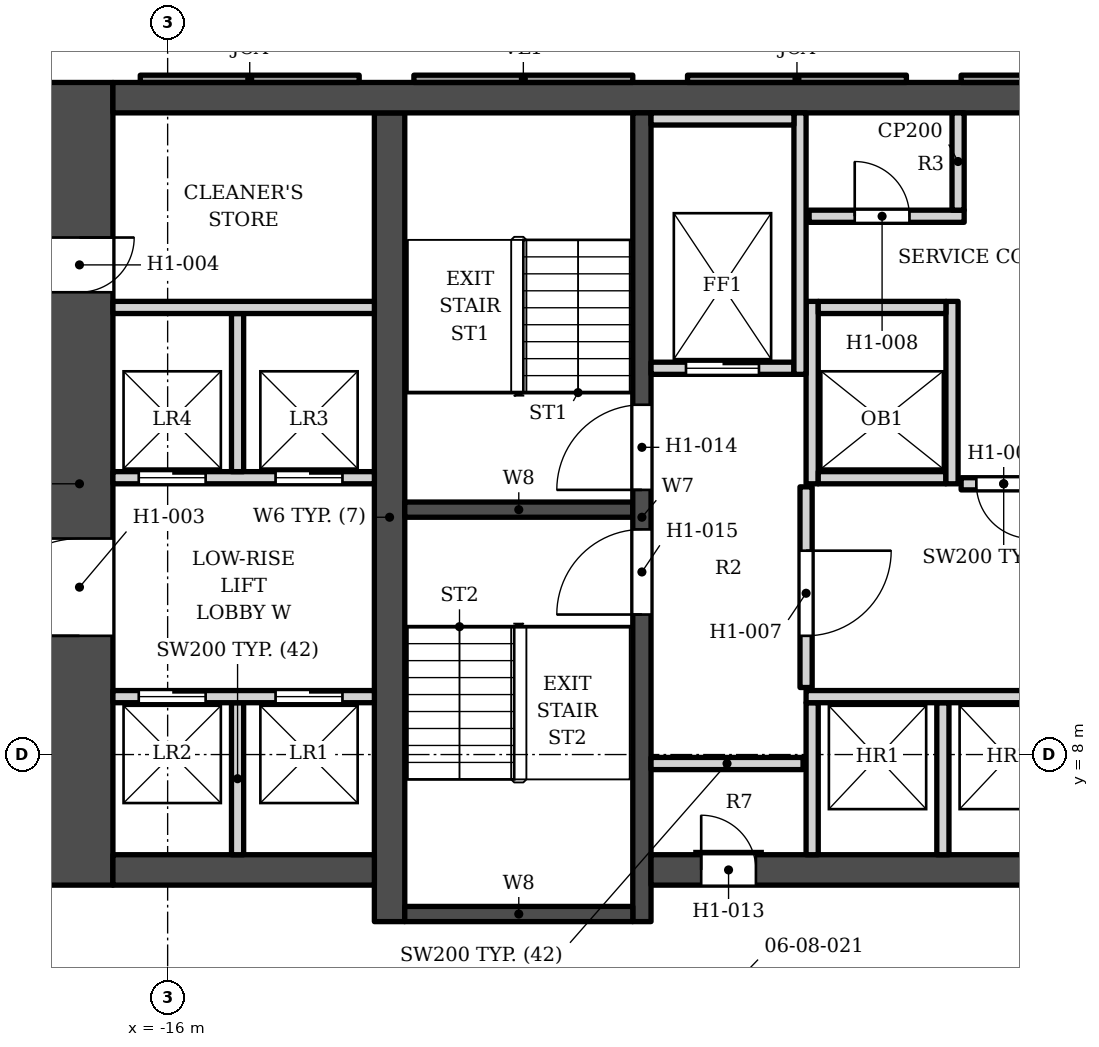
"""IFC4 building model, lengths in metres.
Left out: names, types, materials, properties, quantities, classifications, styles, units other than length and angle.
Written with IfcOpenShell. Run it as: python <this file> out.ifc"""

import sys

from ifc_helpers import new_model, si_unit, direction, frame, frame_2d, origin, place, context, subcontext, project, spatial, polyline, rectangle, outline, extrude, element, fill, save


model = new_model("IFC4")
c1 = context("Model", 3, precision=1e-05, world=origin(), true_north=direction((0.0, 1.0)))
c2 = subcontext(c1, "Body", "Model", "MODEL_VIEW")
j1 = project(units=[si_unit("LENGTHUNIT", "METRE"), si_unit("PLANEANGLEUNIT", "RADIAN")], contexts=[c1])
p1 = place(None, origin())
s1 = spatial("IfcSite", under=j1, at=p1, CompositionType="ELEMENT")
p2 = place(p1, origin())
s2 = spatial("IfcBuilding", under=s1, at=p2, CompositionType="ELEMENT")
p3 = place(p2, frame((0.0, 0.0, 46.0)))
s3 = spatial("IfcBuildingStorey", under=s2, at=p3, CompositionType="ELEMENT", Elevation=46.0)
p4 = place(p3, frame((-16.9, 18.802, 0.0), z_axis=(0.0, 0.0, 1.0), x_axis=(1.0, 0.0, 0.0)))
e1 = element("IfcWall", 1, at=p4, inside=s3, PredefinedType="SHEAR", context=c2, shape_type="SweptSolid", body=[
    extrude(rectangle(XDim=33.8, YDim=0.5, at=frame_2d((16.9, 0.0))), origin(), (0.0, 0.0, 1.0), 3.4),
])
p5 = place(p3, frame((-12.35, 5.253, 0.0), z_axis=(0.0, 0.0, 1.0), x_axis=(0.0, 1.0, 0.0)))
e2 = element("IfcWall", 2, at=p5, inside=s3, PredefinedType="SHEAR", context=c2, shape_type="SweptSolid", body=[
    extrude(rectangle(XDim=13.3, YDim=0.5, at=frame_2d((6.65, 0.0))), origin(), (0.0, 0.0, 1.0), 3.4),
])
p6 = place(p3, frame((-8.2, 5.253, 0.0), z_axis=(0.0, 0.0, 1.0), x_axis=(0.0, 1.0, 0.0)))
e3 = element("IfcWall", 3, at=p6, inside=s3, PredefinedType="SHEAR", context=c2, shape_type="SweptSolid", body=[
    extrude(rectangle(XDim=13.3, YDim=0.3, at=frame_2d((6.65, 0.0))), origin(), (0.0, 0.0, 1.0), 3.4),
])
p7 = place(p6, frame((7.1, 0.0, 0.0)))
e4 = element("IfcOpeningElement", 4, at=p7, cuts=e3, PredefinedType="OPENING", context=c2, shape_type="SweptSolid", body=[
    extrude(rectangle(XDim=1.4, YDim=2.1, at=frame_2d((0.7, 1.05))), frame((0.0, 0.16, 0.0), z_axis=(0.0, -1.0, 0.0), x_axis=(1.0, 0.0, 0.0)), (0.0, 0.0, 1.0), 0.32),
])
p8 = place(p6, frame((5.05, 0.0, 0.0)))
e5 = element("IfcOpeningElement", 5, at=p8, cuts=e3, PredefinedType="OPENING", context=c2, shape_type="SweptSolid", body=[
    extrude(rectangle(XDim=1.4, YDim=2.1, at=frame_2d((0.7, 1.05))), frame((0.0, 0.16, 0.0), z_axis=(0.0, -1.0, 0.0), x_axis=(1.0, 0.0, 0.0)), (0.0, 0.0, 1.0), 0.32),
])
for number, where, z_axis, x_axis in (
    (6, (-12.1, 12.028, 0.0), (0.0, 0.0, 1.0), (1.0, 0.0, 0.0)),
    (7, (-12.1, 5.378, 0.0), (0.0, 0.0, 1.0), (1.0, 0.0, 0.0)),
):
    element("IfcWall", number, at=place(p3, frame(where, z_axis=z_axis, x_axis=x_axis)), inside=s3, PredefinedType="SHEAR", context=c2, shape_type="SweptSolid", body=[
        extrude(rectangle(XDim=3.75, YDim=0.25, at=frame_2d((1.875, 0.0))), origin(), (0.0, 0.0, 1.0), 3.4),
    ])
p9 = place(p3, frame((-8.05, 6.103, 0.0), z_axis=(0.0, 0.0, 1.0), x_axis=(1.0, 0.0, 0.0)))
e8 = element("IfcWall", 8, at=p9, inside=s3, PredefinedType="SHEAR", context=c2, shape_type="SweptSolid", body=[
    extrude(rectangle(XDim=7.05, YDim=0.5, at=frame_2d((3.525, 0.0))), origin(), (0.0, 0.0, 1.0), 3.4),
])
p10 = place(p9, frame((0.825, 0.0, 0.0)))
e9 = element("IfcOpeningElement", 9, at=p10, cuts=e8, PredefinedType="OPENING", context=c2, shape_type="SweptSolid", body=[
    extrude(rectangle(XDim=0.9, YDim=2.1, at=frame_2d((0.45, 1.05))), frame((0.0, 0.26, 0.0), z_axis=(0.0, -1.0, 0.0), x_axis=(1.0, 0.0, 0.0)), (0.0, 0.0, 1.0), 0.52),
])
p11 = place(p3, frame((-12.6, 6.103, 0.0), z_axis=(0.0, 0.0, 1.0), x_axis=(-1.0, 0.0, 0.0)))
e10 = element("IfcWall", 10, at=p11, inside=s3, PredefinedType="SHEAR", context=c2, shape_type="SweptSolid", body=[
    extrude(rectangle(XDim=4.3, YDim=0.5, at=frame_2d((2.15, 0.0))), origin(), (0.0, 0.0, 1.0), 3.4),
])
p12 = place(p3, frame((-17.45, 5.853, 0.0), z_axis=(0.0, 0.0, 1.0), x_axis=(0.0, 1.0, 0.0)))
e11 = element("IfcWall", 11, at=p12, inside=s3, PredefinedType="SHEAR", context=c2, shape_type="SweptSolid", body=[
    extrude(rectangle(XDim=13.2, YDim=1.1, at=frame_2d((6.6, 0.0))), origin(), (0.0, 0.0, 1.0), 3.4),
])
p13 = place(p12, frame((4.1, 0.0, 0.0)))
e12 = element("IfcOpeningElement", 12, at=p13, cuts=e11, PredefinedType="OPENING", context=c2, shape_type="SweptSolid", body=[
    extrude(rectangle(XDim=1.6, YDim=2.1, at=frame_2d((0.8, 1.05))), frame((0.0, 0.56, 0.0), z_axis=(0.0, -1.0, 0.0), x_axis=(1.0, 0.0, 0.0)), (0.0, 0.0, 1.0), 1.12),
])
p14 = place(p12, frame((9.75, 0.0, 0.0)))
e13 = element("IfcOpeningElement", 13, at=p14, cuts=e11, PredefinedType="OPENING", context=c2, shape_type="SweptSolid", body=[
    extrude(rectangle(XDim=0.9, YDim=2.1, at=frame_2d((0.45, 1.05))), frame((0.0, 0.56, 0.0), z_axis=(0.0, -1.0, 0.0), x_axis=(1.0, 0.0, 0.0)), (0.0, 0.0, 1.0), 1.12),
])
p15 = place(p3, origin())
e14 = element("IfcWall", 14, at=p15, inside=s3, PredefinedType="ELEMENTEDWALL", context=c2, shape_type="SweptSolid", body=[
    extrude(outline(polyline([(-2.95, 19.173), (-2.95, 19.052), (0.65, 19.052), (0.65, 19.173), (-2.95, 19.173)])), origin(), (0.0, 0.0, 1.0), 2.65),
])
p16 = place(p3, origin())
e15 = element("IfcWall", 15, at=p16, inside=s3, PredefinedType="SOLIDWALL", context=c2, shape_type="SweptSolid", body=[
    extrude(outline(polyline([(-7.45, 19.173), (-7.45, 19.052), (-3.85, 19.052), (-3.85, 19.173), (-7.45, 19.173)])), origin(), (0.0, 0.0, 1.0), 2.65),
])
p17 = place(p3, origin())
e16 = element("IfcWall", 16, at=p17, inside=s3, PredefinedType="ELEMENTEDWALL", context=c2, shape_type="SweptSolid", body=[
    extrude(outline(polyline([(-11.95, 19.173), (-11.95, 19.052), (-8.35, 19.052), (-8.35, 19.173), (-11.95, 19.173)])), origin(), (0.0, 0.0, 1.0), 2.65),
])
p18 = place(p3, origin())
e17 = element("IfcWall", 17, at=p18, inside=s3, PredefinedType="SOLIDWALL", context=c2, shape_type="SweptSolid", body=[
    extrude(outline(polyline([(-16.45, 19.173), (-16.45, 19.052), (-12.85, 19.052), (-12.85, 19.173), (-16.45, 19.173)])), origin(), (0.0, 0.0, 1.0), 2.65),
])
for number, where, z_axis, x_axis in (
    (18, (-14.85, 6.353, 0.0), (0.0, 0.0, 1.0), (0.0, 1.0, 0.0)),
    (19, (-5.4, 6.353, 0.0), (0.0, 0.0, 1.0), (0.0, 1.0, 0.0)),
    (20, (-3.25, 6.353, 0.0), (0.0, 0.0, 1.0), (0.0, 1.0, 0.0)),
    (21, (-8.05, 7.853, 0.0), (0.0, 0.0, 1.0), (1.0, 0.0, 0.0)),
):
    element("IfcWall", number, at=place(p3, frame(where, z_axis=z_axis, x_axis=x_axis)), inside=s3, PredefinedType="SOLIDWALL", context=c2, shape_type="SweptSolid", body=[
        extrude(rectangle(XDim=2.5, YDim=0.2, at=frame_2d((1.25, 0.0))), origin(), (0.0, 0.0, 1.0), 3.23),
    ])
p19 = place(p3, frame((-16.9, 8.953, 0.0), z_axis=(0.0, 0.0, 1.0), x_axis=(1.0, 0.0, 0.0)))
e22 = element("IfcWall", 22, at=p19, inside=s3, PredefinedType="SOLIDWALL", context=c2, shape_type="SweptSolid", body=[
    extrude(rectangle(XDim=4.3, YDim=0.2, at=frame_2d((2.15, 0.0))), origin(), (0.0, 0.0, 1.0), 3.23),
])
p20 = place(p19, frame((2.675, 0.0, 0.0)))
e23 = element("IfcOpeningElement", 23, at=p20, cuts=e22, PredefinedType="OPENING", context=c2, shape_type="SweptSolid", body=[
    extrude(rectangle(XDim=1.1, YDim=2.1, at=frame_2d((0.55, 1.05))), frame((0.0, 0.11, 0.0), z_axis=(0.0, -1.0, 0.0), x_axis=(1.0, 0.0, 0.0)), (0.0, 0.0, 1.0), 0.22),
])
p21 = place(p19, frame((0.425, 0.0, 0.0)))
e24 = element("IfcOpeningElement", 24, at=p21, cuts=e22, PredefinedType="OPENING", context=c2, shape_type="SweptSolid", body=[
    extrude(rectangle(XDim=1.1, YDim=2.1, at=frame_2d((0.55, 1.05))), frame((0.0, 0.11, 0.0), z_axis=(0.0, -1.0, 0.0), x_axis=(1.0, 0.0, 0.0)), (0.0, 0.0, 1.0), 0.22),
])
p22 = place(p3, frame((-5.5, 8.953, 0.0), z_axis=(0.0, 0.0, 1.0), x_axis=(1.0, 0.0, 0.0)))
e25 = element("IfcWall", 25, at=p22, inside=s3, PredefinedType="SOLIDWALL", context=c2, shape_type="SweptSolid", body=[
    extrude(rectangle(XDim=4.5, YDim=0.2, at=frame_2d((2.25, 0.0))), origin(), (0.0, 0.0, 1.0), 3.23),
])
p23 = place(p3, frame((-5.5, 9.103, 0.0), z_axis=(0.0, 0.0, 1.0), x_axis=(0.0, 1.0, 0.0)))
e26 = element("IfcWall", 26, at=p23, inside=s3, PredefinedType="SOLIDWALL", context=c2, shape_type="SweptSolid", body=[
    extrude(rectangle(XDim=3.3, YDim=0.2, at=frame_2d((1.65, 0.0))), origin(), (0.0, 0.0, 1.0), 3.23),
])
p24 = place(p23, frame((0.85, 0.0, 0.0)))
e27 = element("IfcOpeningElement", 27, at=p24, cuts=e26, PredefinedType="OPENING", context=c2, shape_type="SweptSolid", body=[
    extrude(rectangle(XDim=1.4, YDim=2.1, at=frame_2d((0.7, 1.05))), frame((0.0, 0.11, 0.0), z_axis=(0.0, -1.0, 0.0), x_axis=(1.0, 0.0, 0.0)), (0.0, 0.0, 1.0), 0.22),
])
p25 = place(p3, frame((-2.95, 12.453, 0.0), z_axis=(0.0, 0.0, 1.0), x_axis=(1.0, 0.0, 0.0)))
e28 = element("IfcWall", 28, at=p25, inside=s3, PredefinedType="SOLIDWALL", context=c2, shape_type="SweptSolid", body=[
    extrude(rectangle(XDim=1.4, YDim=0.2, at=frame_2d((0.7, 0.0))), origin(), (0.0, 0.0, 1.0), 3.23),
])
p26 = place(p25, frame((0.25, 0.0, 0.0)))
e29 = element("IfcOpeningElement", 29, at=p26, cuts=e28, PredefinedType="OPENING", context=c2, shape_type="SweptSolid", body=[
    extrude(rectangle(XDim=0.9, YDim=2.1, at=frame_2d((0.45, 1.05))), frame((0.0, 0.11, 0.0), z_axis=(0.0, -1.0, 0.0), x_axis=(1.0, 0.0, 0.0)), (0.0, 0.0, 1.0), 0.22),
])
p27 = place(p3, frame((-16.9, 12.552, 0.0), z_axis=(0.0, 0.0, 1.0), x_axis=(1.0, 0.0, 0.0)))
e30 = element("IfcWall", 30, at=p27, inside=s3, PredefinedType="SOLIDWALL", context=c2, shape_type="SweptSolid", body=[
    extrude(rectangle(XDim=4.3, YDim=0.2, at=frame_2d((2.15, 0.0))), origin(), (0.0, 0.0, 1.0), 3.23),
])
p28 = place(p27, frame((2.675, 0.0, 0.0)))
e31 = element("IfcOpeningElement", 31, at=p28, cuts=e30, PredefinedType="OPENING", context=c2, shape_type="SweptSolid", body=[
    extrude(rectangle(XDim=1.1, YDim=2.1, at=frame_2d((0.55, 1.05))), frame((0.0, 0.11, 0.0), z_axis=(0.0, -1.0, 0.0), x_axis=(1.0, 0.0, 0.0)), (0.0, 0.0, 1.0), 0.22),
])
p29 = place(p27, frame((0.425, 0.0, 0.0)))
e32 = element("IfcOpeningElement", 32, at=p29, cuts=e30, PredefinedType="OPENING", context=c2, shape_type="SweptSolid", body=[
    extrude(rectangle(XDim=1.1, YDim=2.1, at=frame_2d((0.55, 1.05))), frame((0.0, 0.11, 0.0), z_axis=(0.0, -1.0, 0.0), x_axis=(1.0, 0.0, 0.0)), (0.0, 0.0, 1.0), 0.22),
])
p30 = place(p3, frame((-5.4, 12.453, 0.0), z_axis=(0.0, 0.0, 1.0), x_axis=(0.0, 1.0, 0.0)))
e33 = element("IfcWall", 33, at=p30, inside=s3, PredefinedType="SOLIDWALL", context=c2, shape_type="SweptSolid", body=[
    extrude(rectangle(XDim=3.0, YDim=0.2, at=frame_2d((1.5, 0.0))), origin(), (0.0, 0.0, 1.0), 3.23),
])
p31 = place(p3, frame((-5.3, 12.552, 0.0), z_axis=(0.0, 0.0, 1.0), x_axis=(1.0, 0.0, 0.0)))
e34 = element("IfcWall", 34, at=p31, inside=s3, PredefinedType="SOLIDWALL", context=c2, shape_type="SweptSolid", body=[
    extrude(rectangle(XDim=2.1, YDim=0.2, at=frame_2d((1.05, 0.0))), origin(), (0.0, 0.0, 1.0), 3.23),
])
p32 = place(p3, frame((-3.1, 12.453, 0.0), z_axis=(0.0, 0.0, 1.0), x_axis=(0.0, 1.0, 0.0)))
e35 = element("IfcWall", 35, at=p32, inside=s3, PredefinedType="SOLIDWALL", context=c2, shape_type="SweptSolid", body=[
    extrude(rectangle(XDim=3.0, YDim=0.2, at=frame_2d((1.5, 0.0))), origin(), (0.0, 0.0, 1.0), 3.23),
])
p33 = place(p3, frame((-14.85, 12.653, 0.0), z_axis=(0.0, 0.0, 1.0), x_axis=(0.0, 1.0, 0.0)))
e36 = element("IfcWall", 36, at=p33, inside=s3, PredefinedType="SOLIDWALL", context=c2, shape_type="SweptSolid", body=[
    extrude(rectangle(XDim=2.6, YDim=0.2, at=frame_2d((1.3, 0.0))), origin(), (0.0, 0.0, 1.0), 3.23),
])
p34 = place(p3, frame((-8.05, 14.353, 0.0), z_axis=(0.0, 0.0, 1.0), x_axis=(1.0, 0.0, 0.0)))
e37 = element("IfcWall", 37, at=p34, inside=s3, PredefinedType="SOLIDWALL", context=c2, shape_type="SweptSolid", body=[
    extrude(rectangle(XDim=2.35, YDim=0.2, at=frame_2d((1.175, 0.0))), origin(), (0.0, 0.0, 1.0), 3.23),
])
p35 = place(p34, frame((0.575, 0.0, 0.0)))
e38 = element("IfcOpeningElement", 38, at=p35, cuts=e37, PredefinedType="OPENING", context=c2, shape_type="SweptSolid", body=[
    extrude(rectangle(XDim=1.2, YDim=2.1, at=frame_2d((0.6, 1.05))), frame((0.0, 0.11, 0.0), z_axis=(0.0, -1.0, 0.0), x_axis=(1.0, 0.0, 0.0)), (0.0, 0.0, 1.0), 0.22),
])
for number, where, z_axis, x_axis in (
    (39, (-5.6, 14.253, 0.0), (0.0, 0.0, 1.0), (0.0, 1.0, 0.0)),
    (40, (-16.9, 15.353, 0.0), (0.0, 0.0, 1.0), (1.0, 0.0, 0.0)),
):
    element("IfcWall", number, at=place(p3, frame(where, z_axis=z_axis, x_axis=x_axis)), inside=s3, PredefinedType="SOLIDWALL", context=c2, shape_type="SweptSolid", body=[
        extrude(rectangle(XDim=4.3, YDim=0.2, at=frame_2d((2.15, 0.0))), origin(), (0.0, 0.0, 1.0), 3.23),
    ])
p36 = place(p3, frame((-5.3, 15.353, 0.0), z_axis=(0.0, 0.0, 1.0), x_axis=(1.0, 0.0, 0.0)))
e41 = element("IfcWall", 41, at=p36, inside=s3, PredefinedType="SOLIDWALL", context=c2, shape_type="SweptSolid", body=[
    extrude(rectangle(XDim=2.1, YDim=0.2, at=frame_2d((1.05, 0.0))), origin(), (0.0, 0.0, 1.0), 3.23),
])
p37 = place(p3, frame((-5.45, 16.853, 0.0), z_axis=(0.0, 0.0, 1.0), x_axis=(1.0, 0.0, 0.0)))
e42 = element("IfcWall", 42, at=p37, inside=s3, PredefinedType="SOLIDWALL", context=c2, shape_type="SweptSolid", body=[
    extrude(rectangle(XDim=2.55, YDim=0.2, at=frame_2d((1.275, 0.0))), origin(), (0.0, 0.0, 1.0), 3.23),
])
p38 = place(p37, frame((0.75, 0.0, 0.0)))
e43 = element("IfcOpeningElement", 43, at=p38, cuts=e42, PredefinedType="OPENING", context=c2, shape_type="SweptSolid", body=[
    extrude(rectangle(XDim=0.9, YDim=2.1, at=frame_2d((0.45, 1.05))), frame((0.0, 0.11, 0.0), z_axis=(0.0, -1.0, 0.0), x_axis=(1.0, 0.0, 0.0)), (0.0, 0.0, 1.0), 0.22),
])
p39 = place(p3, frame((-3.0, 16.953, 0.0), z_axis=(0.0, 0.0, 1.0), x_axis=(0.0, 1.0, 0.0)))
e44 = element("IfcWall", 44, at=p39, inside=s3, PredefinedType="PARTITIONING", context=c2, shape_type="SweptSolid", body=[
    extrude(rectangle(XDim=1.6, YDim=0.2, at=frame_2d((0.8, 0.0))), origin(), (0.0, 0.0, 1.0), 3.23),
])
p40 = place(p3, frame((-8.05, 18.453, 0.0), z_axis=(0.0, 0.0, 1.0), x_axis=(1.0, 0.0, 0.0)))
e45 = element("IfcWall", 45, at=p40, inside=s3, PredefinedType="SOLIDWALL", context=c2, shape_type="SweptSolid", body=[
    extrude(rectangle(XDim=2.35, YDim=0.2, at=frame_2d((1.175, 0.0))), origin(), (0.0, 0.0, 1.0), 3.23),
])
p41 = place(p35, origin())
e46 = element("IfcDoor", 46, at=p41, inside=s3, OperationType="DOUBLE_DOOR_SLIDING", PredefinedType="DOOR", context=c2, shape_type="SweptSolid", body=[
    extrude(rectangle(XDim=1.2, YDim=2.1, at=frame_2d((0.6, 1.05))), frame((0.0, 0.025, 0.0), z_axis=(0.0, -1.0, 0.0), x_axis=(1.0, 0.0, 0.0)), (0.0, 0.0, 1.0), 0.05),
])
fill(e38, e46)
p42 = place(p20, origin())
e47 = element("IfcDoor", 47, at=p42, inside=s3, OperationType="DOUBLE_DOOR_SLIDING", PredefinedType="DOOR", context=c2, shape_type="SweptSolid", body=[
    extrude(rectangle(XDim=1.1, YDim=2.1, at=frame_2d((0.55, 1.05))), frame((0.0, 0.025, 0.0), z_axis=(0.0, -1.0, 0.0), x_axis=(1.0, 0.0, 0.0)), (0.0, 0.0, 1.0), 0.05),
])
fill(e23, e47)
p43 = place(p28, origin())
e48 = element("IfcDoor", 48, at=p43, inside=s3, OperationType="DOUBLE_DOOR_SLIDING", PredefinedType="DOOR", context=c2, shape_type="SweptSolid", body=[
    extrude(rectangle(XDim=1.1, YDim=2.1, at=frame_2d((0.55, 1.05))), frame((0.0, 0.025, 0.0), z_axis=(0.0, -1.0, 0.0), x_axis=(1.0, 0.0, 0.0)), (0.0, 0.0, 1.0), 0.05),
])
fill(e31, e48)
p44 = place(p21, origin())
e49 = element("IfcDoor", 49, at=p44, inside=s3, OperationType="DOUBLE_DOOR_SLIDING", PredefinedType="DOOR", context=c2, shape_type="SweptSolid", body=[
    extrude(rectangle(XDim=1.1, YDim=2.1, at=frame_2d((0.55, 1.05))), frame((0.0, 0.025, 0.0), z_axis=(0.0, -1.0, 0.0), x_axis=(1.0, 0.0, 0.0)), (0.0, 0.0, 1.0), 0.05),
])
fill(e24, e49)
p45 = place(p29, origin())
e50 = element("IfcDoor", 50, at=p45, inside=s3, OperationType="DOUBLE_DOOR_SLIDING", PredefinedType="DOOR", context=c2, shape_type="SweptSolid", body=[
    extrude(rectangle(XDim=1.1, YDim=2.1, at=frame_2d((0.55, 1.05))), frame((0.0, 0.025, 0.0), z_axis=(0.0, -1.0, 0.0), x_axis=(1.0, 0.0, 0.0)), (0.0, 0.0, 1.0), 0.05),
])
fill(e32, e50)
p46 = place(p7, origin())
e51 = element("IfcDoor", 51, at=p46, inside=s3, OperationType="SINGLE_SWING_LEFT", PredefinedType="DOOR", context=c2, shape_type="SweptSolid", body=[
    extrude(rectangle(XDim=1.4, YDim=2.1, at=frame_2d((0.7, 1.05))), frame((0.0, 0.025, 0.0), z_axis=(0.0, -1.0, 0.0), x_axis=(1.0, 0.0, 0.0)), (0.0, 0.0, 1.0), 0.05),
])
fill(e4, e51)
p47 = place(p8, origin())
e52 = element("IfcDoor", 52, at=p47, inside=s3, OperationType="SINGLE_SWING_LEFT", PredefinedType="DOOR", context=c2, shape_type="SweptSolid", body=[
    extrude(rectangle(XDim=1.4, YDim=2.1, at=frame_2d((0.7, 1.05))), frame((0.0, 0.025, 0.0), z_axis=(0.0, -1.0, 0.0), x_axis=(1.0, 0.0, 0.0)), (0.0, 0.0, 1.0), 0.05),
])
fill(e5, e52)
p48 = place(p26, origin())
e53 = element("IfcDoor", 53, at=p48, inside=s3, OperationType="SINGLE_SWING_RIGHT", PredefinedType="DOOR", context=c2, shape_type="SweptSolid", body=[
    extrude(rectangle(XDim=0.9, YDim=2.1, at=frame_2d((0.45, 1.05))), frame((0.0, 0.025, 0.0), z_axis=(0.0, -1.0, 0.0), x_axis=(1.0, 0.0, 0.0)), (0.0, 0.0, 1.0), 0.05),
])
fill(e29, e53)
p49 = place(p24, origin())
e54 = element("IfcDoor", 54, at=p49, inside=s3, OperationType="SINGLE_SWING_RIGHT", PredefinedType="DOOR", context=c2, shape_type="SweptSolid", body=[
    extrude(rectangle(XDim=1.4, YDim=2.1, at=frame_2d((0.7, 1.05))), frame((0.0, 0.025, 0.0), z_axis=(0.0, -1.0, 0.0), x_axis=(1.0, 0.0, 0.0)), (0.0, 0.0, 1.0), 0.05),
])
fill(e27, e54)
p50 = place(p38, origin())
e55 = element("IfcDoor", 55, at=p50, inside=s3, OperationType="SINGLE_SWING_LEFT", PredefinedType="DOOR", context=c2, shape_type="SweptSolid", body=[
    extrude(rectangle(XDim=0.9, YDim=2.1, at=frame_2d((0.45, 1.05))), frame((0.0, 0.025, 0.0), z_axis=(0.0, -1.0, 0.0), x_axis=(1.0, 0.0, 0.0)), (0.0, 0.0, 1.0), 0.05),
])
fill(e43, e55)
p51 = place(p10, origin())
e56 = element("IfcDoor", 56, at=p51, inside=s3, OperationType="SINGLE_SWING_LEFT", PredefinedType="DOOR", context=c2, shape_type="SweptSolid", body=[
    extrude(rectangle(XDim=0.9, YDim=2.1, at=frame_2d((0.45, 1.05))), frame((0.0, 0.025, 0.0), z_axis=(0.0, -1.0, 0.0), x_axis=(1.0, 0.0, 0.0)), (0.0, 0.0, 1.0), 0.05),
])
fill(e9, e56)
p52 = place(p13, origin())
e57 = element("IfcDoor", 57, at=p52, inside=s3, OperationType="DOUBLE_DOOR_SINGLE_SWING", PredefinedType="DOOR", context=c2, shape_type="SweptSolid", body=[
    extrude(rectangle(XDim=1.6, YDim=2.1, at=frame_2d((0.8, 1.05))), frame((0.0, -0.225, 0.0), z_axis=(0.0, -1.0, 0.0), x_axis=(1.0, 0.0, 0.0)), (0.0, 0.0, 1.0), 0.05),
])
fill(e12, e57)
p53 = place(p14, origin())
e58 = element("IfcDoor", 58, at=p53, inside=s3, OperationType="SINGLE_SWING_RIGHT", PredefinedType="DOOR", context=c2, shape_type="SweptSolid", body=[
    extrude(rectangle(XDim=0.9, YDim=2.1, at=frame_2d((0.45, 1.05))), frame((0.0, -0.225, 0.0), z_axis=(0.0, -1.0, 0.0), x_axis=(1.0, 0.0, 0.0)), (0.0, 0.0, 1.0), 0.05),
])
fill(e13, e58)
save(model, sys.argv[1])
